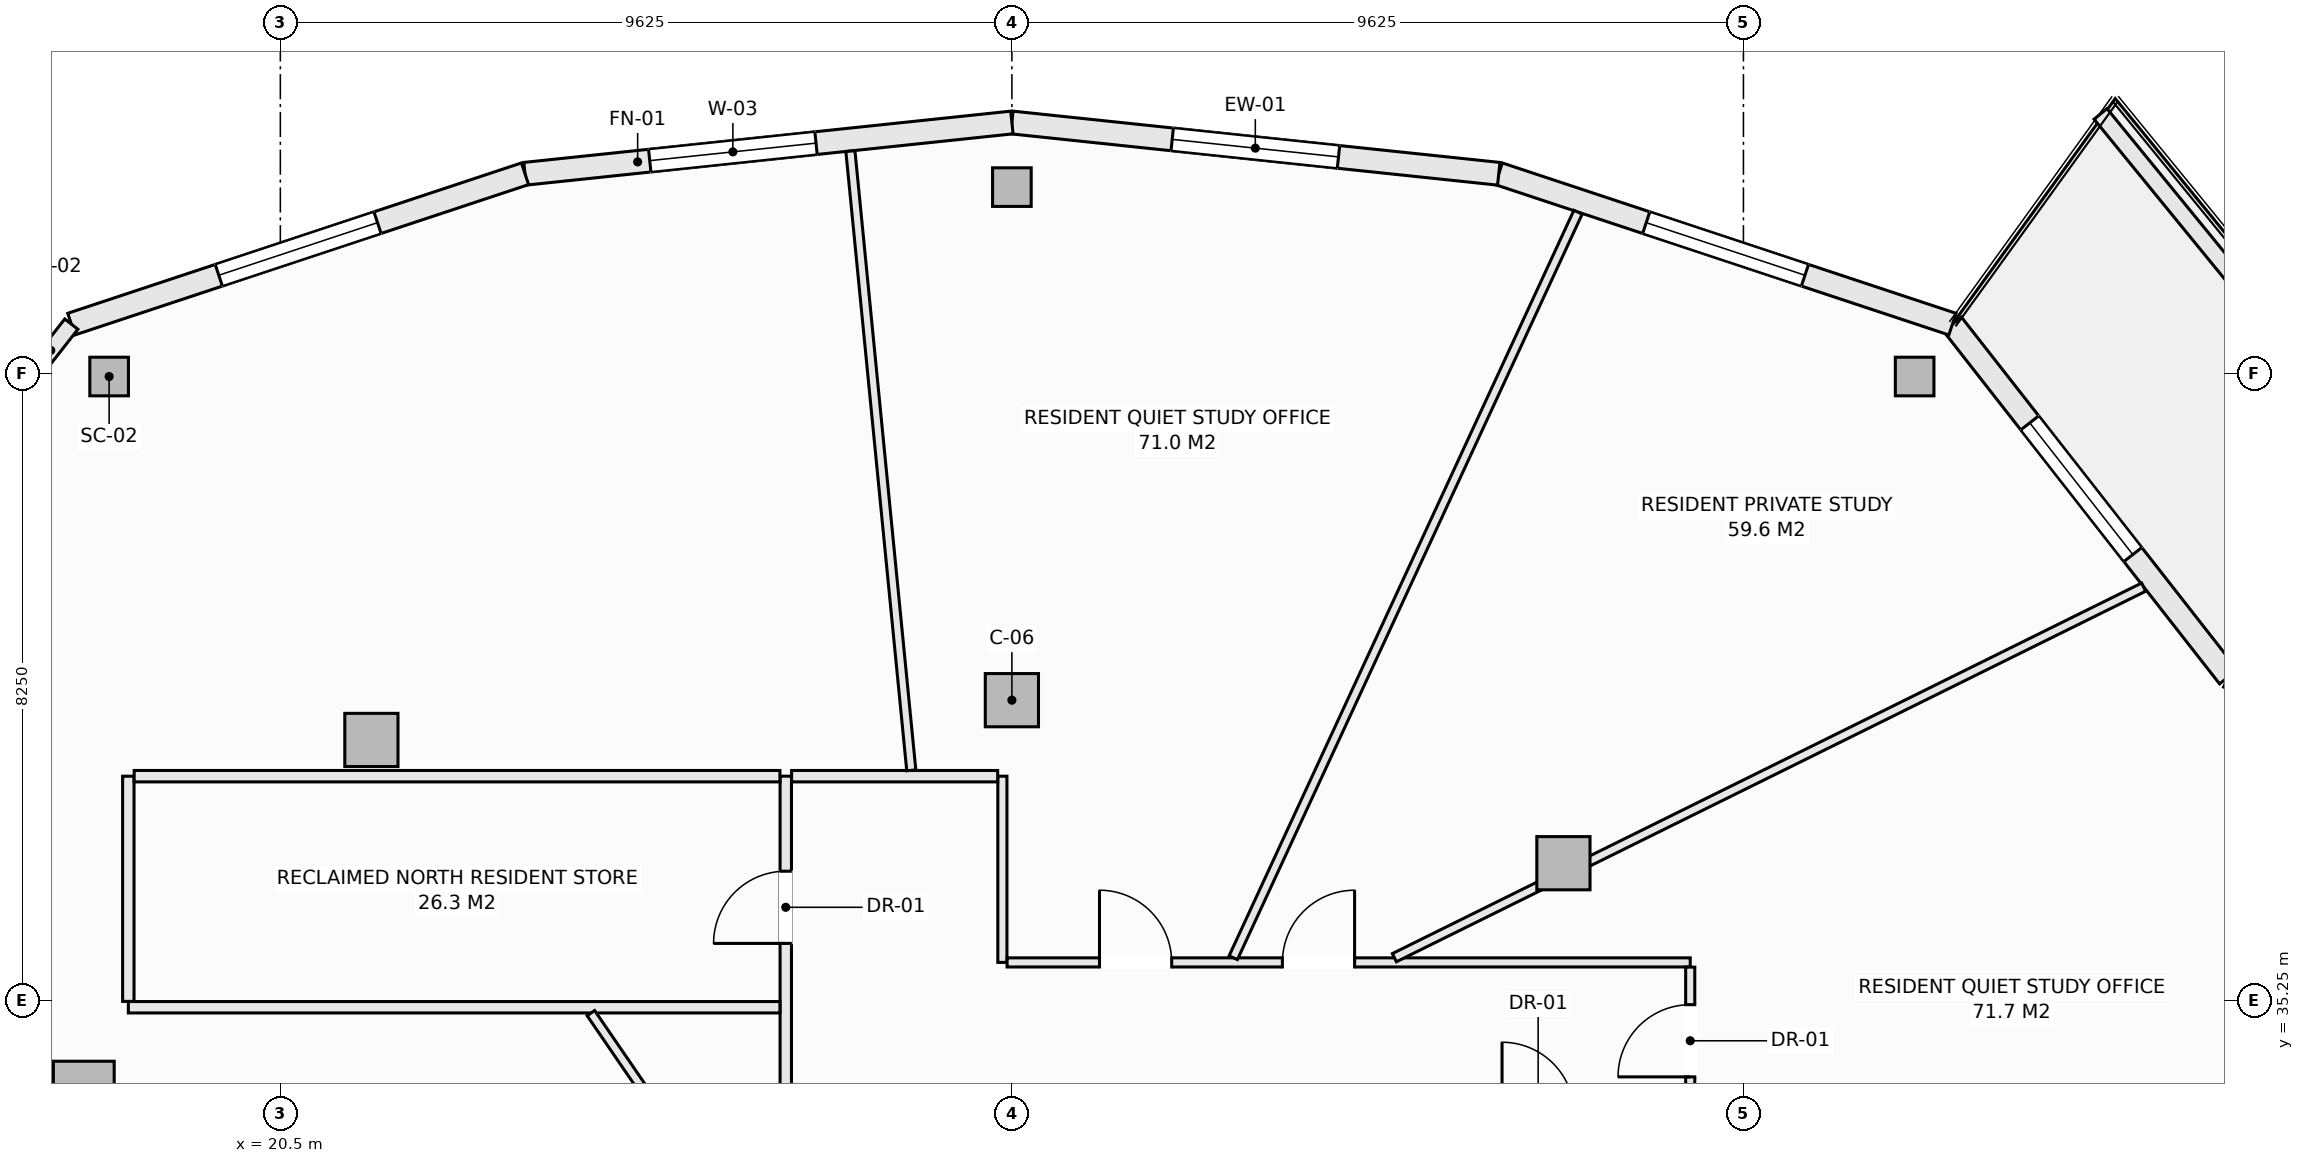
"""IFC4 building model, lengths in metres.
Left out: names, types, materials, properties, quantities, classifications, styles, units other than length and angle.
Written with IfcOpenShell. Run it as: python <this file> out.ifc"""

import sys

from ifc_helpers import new_model, si_unit, direction, frame, frame_2d, origin, origin_2d, place, context, subcontext, project, spatial, rectangle, hollow_rectangle, extrude, element, fill, save


model = new_model("IFC4")
c1 = context("Model", 3, precision=1e-05, world=origin(), true_north=direction((0.0, 1.0)))
c2 = subcontext(c1, "Body", "Model", "MODEL_VIEW")
j1 = project(units=[si_unit("LENGTHUNIT", "METRE"), si_unit("PLANEANGLEUNIT", "RADIAN")], contexts=[c1])
p1 = place(None, origin())
s1 = spatial("IfcSite", under=j1, at=p1, CompositionType="ELEMENT")
p2 = place(p1, origin())
s2 = spatial("IfcBuilding", under=s1, at=p2, CompositionType="ELEMENT")
p3 = place(p2, frame((0.0, 0.0, 206.3)))
s3 = spatial("IfcBuildingStorey", under=s2, at=p3, CompositionType="ELEMENT", Elevation=206.3)
for number, where, z_axis, x_axis in (
    (1, (42.003, 43.458, -0.27), (0.0, 0.0, 1.0), (1.0, 0.0, 0.0)),
    (2, (30.125, 45.95, -0.27), (0.0, 0.0, 1.0), (1.0, 0.0, 0.0)),
    (3, (18.247, 43.458, -0.27), (0.0, 0.0, 1.0), (1.0, 0.0, 0.0)),
):
    element("IfcColumn", number, at=place(p3, frame(where, z_axis=z_axis, x_axis=x_axis)), inside=s3, PredefinedType="COLUMN", context=c2, shape_type="SweptSolid", body=[
        extrude(hollow_rectangle(XDim=0.508, YDim=0.508, WallThickness=0.019, at=origin_2d()), origin(), (0.0, 0.0, 1.0), 3.3),
    ])
for number, where, z_axis, x_axis in (
    (4, (37.382, 37.055, -0.27), (0.0, 0.0, 1.0), (1.0, 0.0, 0.0)),
    (5, (30.125, 39.2, -0.27), (0.0, 0.0, 1.0), (1.0, 0.0, 0.0)),
    (6, (21.698, 38.677, -0.27), (0.0, 0.0, 1.0), (1.0, 0.0, 0.0)),
):
    element("IfcColumn", number, at=place(p3, frame(where, z_axis=z_axis, x_axis=x_axis)), inside=s3, PredefinedType="COLUMN", context=c2, shape_type="SweptSolid", body=[
        extrude(rectangle(XDim=0.7, YDim=0.7, at=origin_2d()), origin(), (0.0, 0.0, 1.0), 3.3),
    ])
p4 = place(p3, frame((17.914, 34.05, -0.27), z_axis=(0.0, 0.0, 1.0), x_axis=(1.0, 0.0, 0.0)))
e7 = element("IfcColumn", 7, at=p4, inside=s3, PredefinedType="PILASTER", context=c2, shape_type="SweptSolid", body=[
    extrude(rectangle(XDim=0.8, YDim=0.8, at=origin_2d()), origin(), (0.0, 0.0, 1.0), 3.3),
])
p5 = place(p3, frame((46.133, 39.507, 0.0), z_axis=(0.0, 0.0, 1.0), x_axis=(0.901348331142, -0.433094892545, 0.0)))
e8 = element("IfcWall", 8, at=p5, inside=s3, PredefinedType="SOLIDWALL", context=c2, shape_type="SweptSolid", body=[
    extrude(rectangle(XDim=6.021, YDim=0.3, at=frame_2d((3.01, 0.0))), origin(), (0.0, 0.0, 1.0), 2.605),
])
p6 = place(p5, frame((1.5, 0.0, 0.0)))
e9 = element("IfcOpeningElement", 9, at=p6, cuts=e8, PredefinedType="OPENING", context=c2, shape_type="SweptSolid", body=[
    extrude(rectangle(XDim=1.8, YDim=2.25, at=frame_2d((0.9, 1.125))), frame((0.0, 0.16, 0.0), z_axis=(0.0, -1.0, 0.0), x_axis=(1.0, 0.0, 0.0)), (0.0, 0.0, 1.0), 0.32),
])
p7 = place(p3, frame((42.5, 44.147, 0.0), z_axis=(0.0, 0.0, 1.0), x_axis=(0.616450126935, -0.787393955401, 0.0)))
e10 = element("IfcWall", 10, at=p7, inside=s3, PredefinedType="SOLIDWALL", context=c2, shape_type="SweptSolid", body=[
    extrude(rectangle(XDim=5.893, YDim=0.3, at=frame_2d((2.946, 0.0))), origin(), (0.0, 0.0, 1.0), 2.605),
])
p8 = place(p7, frame((1.65, 0.0, 0.72)))
e11 = element("IfcOpeningElement", 11, at=p8, cuts=e10, PredefinedType="OPENING", context=c2, shape_type="SweptSolid", body=[
    extrude(rectangle(XDim=2.2, YDim=1.65, at=frame_2d((1.1, 0.825))), frame((0.0, 0.16, 0.0), z_axis=(0.0, -1.0, 0.0), x_axis=(1.0, 0.0, 0.0)), (0.0, 0.0, 1.0), 0.32),
])
p9 = place(p3, frame((36.531, 46.125, 0.0), z_axis=(0.0, 0.0, 1.0), x_axis=(0.949240877604, -0.314550085495, 0.0)))
e12 = element("IfcWall", 12, at=p9, inside=s3, PredefinedType="SOLIDWALL", context=c2, shape_type="SweptSolid", body=[
    extrude(rectangle(XDim=6.288, YDim=0.3, at=frame_2d((3.144, 0.0))), origin(), (0.0, 0.0, 1.0), 2.605),
])
p10 = place(p9, frame((2.044, 0.0, 0.72)))
e13 = element("IfcOpeningElement", 13, at=p10, cuts=e12, PredefinedType="OPENING", context=c2, shape_type="SweptSolid", body=[
    extrude(rectangle(XDim=2.2, YDim=1.65, at=frame_2d((1.1, 0.825))), frame((0.0, 0.16, 0.0), z_axis=(0.0, -1.0, 0.0), x_axis=(1.0, 0.0, 0.0)), (0.0, 0.0, 1.0), 0.32),
])
p11 = place(p3, frame((30.125, 46.8, 0.0), z_axis=(0.0, 0.0, 1.0), x_axis=(0.994497142298, -0.104763705363, 0.0)))
e14 = element("IfcWall", 14, at=p11, inside=s3, PredefinedType="SOLIDWALL", context=c2, shape_type="SweptSolid", body=[
    extrude(rectangle(XDim=6.441, YDim=0.3, at=frame_2d((3.221, 0.0))), origin(), (0.0, 0.0, 1.0), 2.605),
])
p12 = place(p11, frame((2.121, 0.0, 0.72)))
e15 = element("IfcOpeningElement", 15, at=p12, cuts=e14, PredefinedType="OPENING", context=c2, shape_type="SweptSolid", body=[
    extrude(rectangle(XDim=2.2, YDim=1.65, at=frame_2d((1.1, 0.825))), frame((0.0, 0.16, 0.0), z_axis=(0.0, -1.0, 0.0), x_axis=(1.0, 0.0, 0.0)), (0.0, 0.0, 1.0), 0.32),
])
p13 = place(p3, frame((23.719, 46.125, 0.0), z_axis=(0.0, 0.0, 1.0), x_axis=(0.994497142298, 0.104763705363, 0.0)))
e16 = element("IfcWall", 16, at=p13, inside=s3, PredefinedType="SOLIDWALL", context=c2, shape_type="SweptSolid", body=[
    extrude(rectangle(XDim=6.441, YDim=0.3, at=frame_2d((3.221, 0.0))), origin(), (0.0, 0.0, 1.0), 2.605),
])
p14 = place(p13, frame((1.65, 0.0, 0.72)))
e17 = element("IfcOpeningElement", 17, at=p14, cuts=e16, PredefinedType="OPENING", context=c2, shape_type="SweptSolid", body=[
    extrude(rectangle(XDim=2.2, YDim=1.65, at=frame_2d((1.1, 0.825))), frame((0.0, 0.16, 0.0), z_axis=(0.0, -1.0, 0.0), x_axis=(1.0, 0.0, 0.0)), (0.0, 0.0, 1.0), 0.32),
])
p15 = place(p3, frame((17.75, 44.147, 0.0), z_axis=(0.0, 0.0, 1.0), x_axis=(0.949240877604, 0.314550085495, 0.0)))
e18 = element("IfcWall", 18, at=p15, inside=s3, PredefinedType="SOLIDWALL", context=c2, shape_type="SweptSolid", body=[
    extrude(rectangle(XDim=6.288, YDim=0.3, at=frame_2d((3.144, 0.0))), origin(), (0.0, 0.0, 1.0), 2.605),
])
p16 = place(p15, frame((2.044, 0.0, 0.72)))
e19 = element("IfcOpeningElement", 19, at=p16, cuts=e18, PredefinedType="OPENING", context=c2, shape_type="SweptSolid", body=[
    extrude(rectangle(XDim=2.2, YDim=1.65, at=frame_2d((1.1, 0.825))), frame((0.0, 0.16, 0.0), z_axis=(0.0, -1.0, 0.0), x_axis=(1.0, 0.0, 0.0)), (0.0, 0.0, 1.0), 0.32),
])
p17 = place(p3, frame((17.21, 43.458, 0.0), z_axis=(0.0, 0.0, 1.0), x_axis=(0.616466126167, 0.787381429352, 0.0)))
e20 = element("IfcWall", 20, at=p17, inside=s3, PredefinedType="SOLIDWALL", context=c2, shape_type="SweptSolid", body=[
    extrude(rectangle(XDim=0.876, YDim=0.22, at=frame_2d((0.438, 0.0))), origin(), (0.0, 0.0, 1.0), 2.605),
])
p18 = place(p3, frame((44.448, 46.913, 0.0), z_axis=(0.0, 0.0, 1.0), x_axis=(0.632697312147, -0.774399193699, 0.0)))
e21 = element("IfcWall", 21, at=p18, inside=s3, PredefinedType="PARAPET", context=c2, shape_type="SweptSolid", body=[
    extrude(rectangle(XDim=6.914, YDim=0.22, at=frame_2d((3.457, 0.0))), origin(), (0.0, 0.0, 1.0), 0.52),
])
p19 = place(p3, frame((27.15, 34.002, 0.0), z_axis=(0.0, 0.0, 1.0), x_axis=(0.0, 1.0, 0.0)))
e22 = element("IfcWall", 22, at=p19, inside=s3, PredefinedType="PARTITIONING", context=c2, shape_type="SweptSolid", body=[
    extrude(rectangle(XDim=4.198, YDim=0.15, at=frame_2d((2.099, 0.0))), origin(), (0.0, 0.0, 1.0), 3.03),
])
p20 = place(p19, frame((1.998, 0.0, 0.0)))
e23 = element("IfcOpeningElement", 23, at=p20, cuts=e22, PredefinedType="OPENING", context=c2, shape_type="SweptSolid", body=[
    extrude(rectangle(XDim=0.95, YDim=2.1, at=frame_2d((0.475, 1.05))), frame((0.0, 0.085, 0.0), z_axis=(0.0, -1.0, 0.0), x_axis=(1.0, 0.0, 0.0)), (0.0, 0.0, 1.0), 0.17),
])
p21 = place(p3, frame((30.0, 35.75, 0.0), z_axis=(0.0, 0.0, 1.0), x_axis=(0.0, 1.0, 0.0)))
e24 = element("IfcWall", 24, at=p21, inside=s3, PredefinedType="PARTITIONING", context=c2, shape_type="SweptSolid", body=[
    extrude(rectangle(XDim=2.45, YDim=0.12, at=frame_2d((1.225, 0.0))), origin(), (0.0, 0.0, 1.0), 3.03),
])
p22 = place(p3, frame((18.5, 35.16, 0.0), z_axis=(0.0, 0.0, 1.0), x_axis=(1.0, 0.0, 0.0)))
e25 = element("IfcWall", 25, at=p22, inside=s3, PredefinedType="PARTITIONING", context=c2, shape_type="SweptSolid", body=[
    extrude(rectangle(XDim=8.573, YDim=0.15, at=frame_2d((4.287, 0.0))), origin(), (0.0, 0.0, 1.0), 3.03),
])
p23 = place(p3, frame((18.5, 35.237, 0.0), z_axis=(0.0, 0.0, 1.0), x_axis=(0.0, 1.0, 0.0)))
e26 = element("IfcWall", 26, at=p23, inside=s3, PredefinedType="PARTITIONING", context=c2, shape_type="SweptSolid", body=[
    extrude(rectangle(XDim=2.963, YDim=0.15, at=frame_2d((1.481, 0.0))), origin(), (0.0, 0.0, 1.0), 3.03),
])
p24 = place(p3, frame((18.577, 38.2, 0.0), z_axis=(0.0, 0.0, 1.0), x_axis=(1.0, 0.0, 0.0)))
e27 = element("IfcWall", 27, at=p24, inside=s3, PredefinedType="PARTITIONING", context=c2, shape_type="SweptSolid", body=[
    extrude(rectangle(XDim=8.496, YDim=0.15, at=frame_2d((4.248, 0.0))), origin(), (0.0, 0.0, 1.0), 3.03),
])
p25 = place(p3, frame((27.227, 38.2, 0.0), z_axis=(0.0, 0.0, 1.0), x_axis=(1.0, 0.0, 0.0)))
e28 = element("IfcWall", 28, at=p25, inside=s3, PredefinedType="PARTITIONING", context=c2, shape_type="SweptSolid", body=[
    extrude(rectangle(XDim=2.711, YDim=0.15, at=frame_2d((1.355, 0.0))), origin(), (0.0, 0.0, 1.0), 3.03),
])
p26 = place(p3, frame((30.062, 35.75, 0.0), z_axis=(0.0, 0.0, 1.0), x_axis=(1.0, 0.0, 0.0)))
e29 = element("IfcWall", 29, at=p26, inside=s3, PredefinedType="PARTITIONING", context=c2, shape_type="SweptSolid", body=[
    extrude(rectangle(XDim=8.988, YDim=0.12, at=frame_2d((4.494, 0.0))), origin(), (0.0, 0.0, 1.0), 2.478),
])
p27 = place(p26, frame((3.622, 0.0, 0.0)))
e30 = element("IfcOpeningElement", 30, at=p27, cuts=e29, PredefinedType="OPENING", context=c2, shape_type="SweptSolid", body=[
    extrude(rectangle(XDim=0.95, YDim=2.1, at=frame_2d((0.475, 1.05))), frame((0.0, 0.07, 0.0), z_axis=(0.0, -1.0, 0.0), x_axis=(1.0, 0.0, 0.0)), (0.0, 0.0, 1.0), 0.14),
])
p28 = place(p26, frame((1.216, 0.0, 0.0)))
e31 = element("IfcOpeningElement", 31, at=p28, cuts=e29, PredefinedType="OPENING", context=c2, shape_type="SweptSolid", body=[
    extrude(rectangle(XDim=0.95, YDim=2.1, at=frame_2d((0.475, 1.05))), frame((0.0, 0.07, 0.0), z_axis=(0.0, -1.0, 0.0), x_axis=(1.0, 0.0, 0.0)), (0.0, 0.0, 1.0), 0.14),
])
p29 = place(p3, frame((39.05, 33.75, 0.0), z_axis=(0.0, 0.0, 1.0), x_axis=(0.0, 1.0, 0.0)))
e32 = element("IfcWall", 32, at=p29, inside=s3, PredefinedType="PARTITIONING", context=c2, shape_type="SweptSolid", body=[
    extrude(rectangle(XDim=1.938, YDim=0.12, at=frame_2d((0.969, 0.0))), origin(), (0.0, 0.0, 1.0), 3.03),
])
p30 = place(p29, frame((0.494, 0.0, 0.0)))
e33 = element("IfcOpeningElement", 33, at=p30, cuts=e32, PredefinedType="OPENING", context=c2, shape_type="SweptSolid", body=[
    extrude(rectangle(XDim=0.95, YDim=2.1, at=frame_2d((0.475, 1.05))), frame((0.0, 0.07, 0.0), z_axis=(0.0, -1.0, 0.0), x_axis=(1.0, 0.0, 0.0)), (0.0, 0.0, 1.0), 0.14),
])
p31 = place(p3, frame((28.0, 46.423, 0.0), z_axis=(0.0, 0.0, 1.0), x_axis=(0.097888269922, -0.995197410875, 0.0)))
e34 = element("IfcWall", 34, at=p31, inside=s3, PredefinedType="PARTITIONING", context=c2, shape_type="SweptSolid", body=[
    extrude(rectangle(XDim=8.186, YDim=0.12, at=frame_2d((4.093, 0.0))), origin(), (0.0, 0.0, 1.0), 3.03),
])
p32 = place(p3, frame((41.582, 16.617, 0.0), z_axis=(0.0, 0.0, 1.0), x_axis=(0.534374121444, 0.845248069108, 0.0)))
e35 = element("IfcWall", 35, at=p32, inside=s3, PredefinedType="PARTITIONING", context=c2, shape_type="SweptSolid", body=[
    extrude(rectangle(XDim=20.892, YDim=0.12, at=frame_2d((10.446, 0.0))), origin(), (0.0, 0.0, 1.0), 3.03),
])
p33 = place(p3, frame((44.01, 31.0, 0.0), z_axis=(0.0, 0.0, 1.0), x_axis=(0.635986973411, 0.771699792439, 0.0)))
e36 = element("IfcWall", 36, at=p33, inside=s3, PredefinedType="PARTITIONING", context=c2, shape_type="SweptSolid", body=[
    extrude(rectangle(XDim=8.687, YDim=0.12, at=frame_2d((4.344, 0.0))), origin(), (0.0, 0.0, 1.0), 2.712),
])
p34 = place(p3, frame((35.157, 35.812, 0.0), z_axis=(0.0, 0.0, 1.0), x_axis=(0.896376577458, 0.443293391992, 0.0)))
e37 = element("IfcWall", 37, at=p34, inside=s3, PredefinedType="PARTITIONING", context=c2, shape_type="SweptSolid", body=[
    extrude(rectangle(XDim=10.998, YDim=0.12, at=frame_2d((5.499, 0.0))), origin(), (0.0, 0.0, 1.0), 2.478),
])
p35 = place(p3, frame((33.038, 35.812, 0.0), z_axis=(0.0, 0.0, 1.0), x_axis=(0.419785881818, 0.907623167083, 0.0)))
e38 = element("IfcWall", 38, at=p35, inside=s3, PredefinedType="PARTITIONING", context=c2, shape_type="SweptSolid", body=[
    extrude(rectangle(XDim=10.806, YDim=0.12, at=frame_2d((5.403, 0.0))), origin(), (0.0, 0.0, 1.0), 3.03),
])
p36 = place(p3, frame((24.586, 35.083, 0.0), z_axis=(0.0, 0.0, 1.0), x_axis=(0.565231440294, -0.824932372321, 0.0)))
e39 = element("IfcWall", 39, at=p36, inside=s3, PredefinedType="PARTITIONING", context=c2, shape_type="SweptSolid", body=[
    extrude(rectangle(XDim=1.311, YDim=0.12, at=frame_2d((0.655, 0.0))), origin(), (0.0, 0.0, 1.0), 3.03),
])
p37 = place(p8, origin())
e40 = element("IfcWindow", 40, at=p37, inside=s3, PartitioningType="SINGLE_PANEL", PredefinedType="WINDOW", context=c2, shape_type="SweptSolid", body=[
    extrude(rectangle(XDim=2.2, YDim=1.65, at=frame_2d((1.1, 0.825))), frame((0.0, 0.03, 0.0), z_axis=(0.0, -1.0, 0.0), x_axis=(1.0, 0.0, 0.0)), (0.0, 0.0, 1.0), 0.06),
])
fill(e11, e40)
p38 = place(p10, origin())
e41 = element("IfcWindow", 41, at=p38, inside=s3, PartitioningType="SINGLE_PANEL", PredefinedType="WINDOW", context=c2, shape_type="SweptSolid", body=[
    extrude(rectangle(XDim=2.2, YDim=1.65, at=frame_2d((1.1, 0.825))), frame((0.0, 0.03, 0.0), z_axis=(0.0, -1.0, 0.0), x_axis=(1.0, 0.0, 0.0)), (0.0, 0.0, 1.0), 0.06),
])
fill(e13, e41)
p39 = place(p12, origin())
e42 = element("IfcWindow", 42, at=p39, inside=s3, PartitioningType="SINGLE_PANEL", PredefinedType="WINDOW", context=c2, shape_type="SweptSolid", body=[
    extrude(rectangle(XDim=2.2, YDim=1.65, at=frame_2d((1.1, 0.825))), frame((0.0, 0.03, 0.0), z_axis=(0.0, -1.0, 0.0), x_axis=(1.0, 0.0, 0.0)), (0.0, 0.0, 1.0), 0.06),
])
fill(e15, e42)
p40 = place(p14, origin())
e43 = element("IfcWindow", 43, at=p40, inside=s3, PartitioningType="SINGLE_PANEL", PredefinedType="WINDOW", context=c2, shape_type="SweptSolid", body=[
    extrude(rectangle(XDim=2.2, YDim=1.65, at=frame_2d((1.1, 0.825))), frame((0.0, 0.03, 0.0), z_axis=(0.0, -1.0, 0.0), x_axis=(1.0, 0.0, 0.0)), (0.0, 0.0, 1.0), 0.06),
])
fill(e17, e43)
p41 = place(p16, origin())
e44 = element("IfcWindow", 44, at=p41, inside=s3, PartitioningType="SINGLE_PANEL", PredefinedType="WINDOW", context=c2, shape_type="SweptSolid", body=[
    extrude(rectangle(XDim=2.2, YDim=1.65, at=frame_2d((1.1, 0.825))), frame((0.0, 0.03, 0.0), z_axis=(0.0, -1.0, 0.0), x_axis=(1.0, 0.0, 0.0)), (0.0, 0.0, 1.0), 0.06),
])
fill(e19, e44)
p42 = place(p20, origin())
e45 = element("IfcDoor", 45, at=p42, inside=s3, OperationType="SINGLE_SWING_LEFT", PredefinedType="DOOR", context=c2, shape_type="SweptSolid", body=[
    extrude(rectangle(XDim=0.95, YDim=2.1, at=frame_2d((0.475, 1.05))), frame((0.0, 0.025, 0.0), z_axis=(0.0, -1.0, 0.0), x_axis=(1.0, 0.0, 0.0)), (0.0, 0.0, 1.0), 0.05),
])
fill(e23, e45)
p43 = place(p30, origin())
e46 = element("IfcDoor", 46, at=p43, inside=s3, OperationType="SINGLE_SWING_LEFT", PredefinedType="DOOR", context=c2, shape_type="SweptSolid", body=[
    extrude(rectangle(XDim=0.95, YDim=2.1, at=frame_2d((0.475, 1.05))), frame((0.0, 0.025, 0.0), z_axis=(0.0, -1.0, 0.0), x_axis=(1.0, 0.0, 0.0)), (0.0, 0.0, 1.0), 0.05),
])
fill(e33, e46)
p44 = place(p27, origin())
e47 = element("IfcDoor", 47, at=p44, inside=s3, OperationType="SINGLE_SWING_RIGHT", PredefinedType="DOOR", context=c2, shape_type="SweptSolid", body=[
    extrude(rectangle(XDim=0.95, YDim=2.1, at=frame_2d((0.475, 1.05))), frame((0.0, 0.025, 0.0), z_axis=(0.0, -1.0, 0.0), x_axis=(1.0, 0.0, 0.0)), (0.0, 0.0, 1.0), 0.05),
])
fill(e30, e47)
p45 = place(p28, origin())
e48 = element("IfcDoor", 48, at=p45, inside=s3, OperationType="SINGLE_SWING_LEFT", PredefinedType="DOOR", context=c2, shape_type="SweptSolid", body=[
    extrude(rectangle(XDim=0.95, YDim=2.1, at=frame_2d((0.475, 1.05))), frame((0.0, 0.025, 0.0), z_axis=(0.0, -1.0, 0.0), x_axis=(1.0, 0.0, 0.0)), (0.0, 0.0, 1.0), 0.05),
])
fill(e31, e48)
save(model, sys.argv[1])
